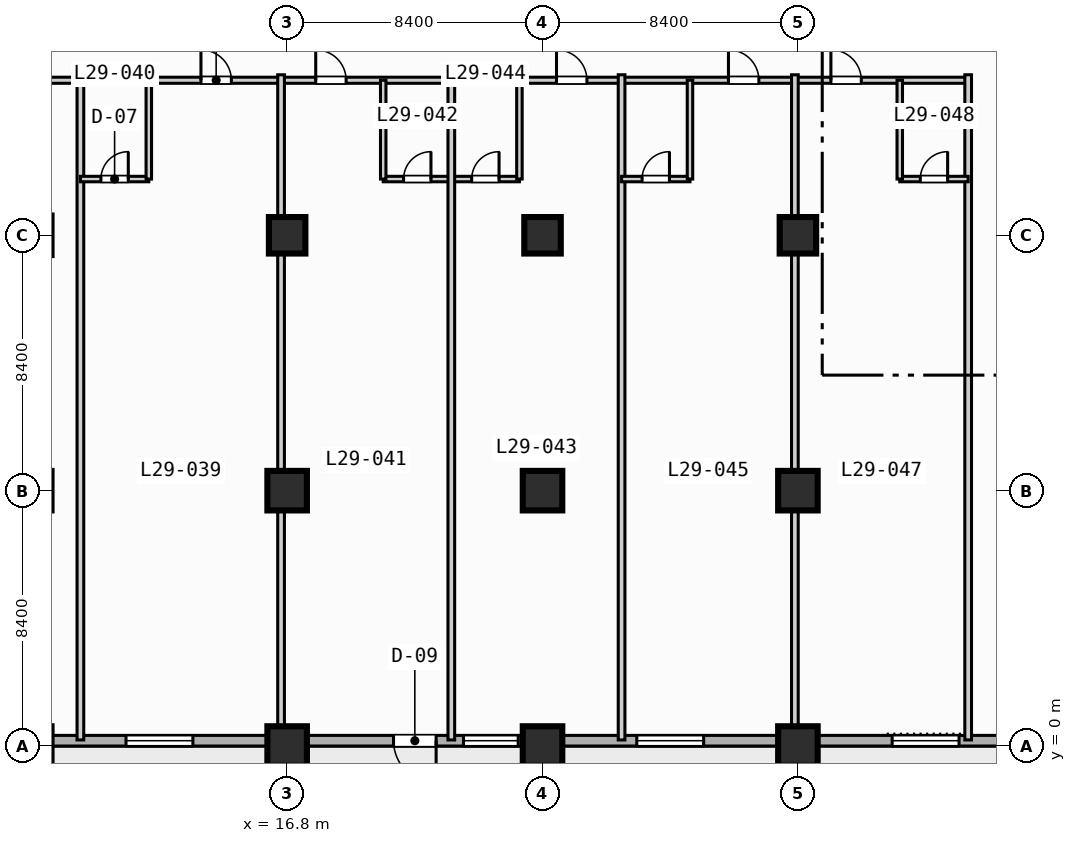
"""IFC4 building model, lengths in metres.
Left out: names, types, materials, properties, quantities, classifications, styles, units other than length and angle.
Written with IfcOpenShell. Run it as: python <this file> out.ifc"""

import sys

from ifc_helpers import new_model, si_unit, direction, frame, frame_2d, origin, origin_2d, place, context, subcontext, project, spatial, rectangle, extrude, element, fill, save


model = new_model("IFC4")
c1 = context("Model", 3, precision=1e-05, world=origin(), true_north=direction((0.0, 1.0)))
c2 = subcontext(c1, "Body", "Model", "MODEL_VIEW")
j1 = project(units=[si_unit("LENGTHUNIT", "METRE"), si_unit("PLANEANGLEUNIT", "RADIAN")], contexts=[c1])
p1 = place(None, origin())
s1 = spatial("IfcSite", under=j1, at=p1, CompositionType="ELEMENT")
p2 = place(p1, origin())
s2 = spatial("IfcBuilding", under=s1, at=p2, CompositionType="ELEMENT")
p3 = place(p2, frame((0.0, 0.0, 122.8)))
s3 = spatial("IfcBuildingStorey", under=s2, at=p3, CompositionType="ELEMENT", Elevation=122.8)
for number, where, z_axis, x_axis in (
    (1, (16.8, 0.0, 0.0), (0.0, 0.0, 1.0), (1.0, 0.0, 0.0)),
    (2, (16.8, 8.4, 0.0), (0.0, 0.0, 1.0), (1.0, 0.0, 0.0)),
):
    element("IfcColumn", number, at=place(p3, frame(where, z_axis=z_axis, x_axis=x_axis)), inside=s3, PredefinedType="COLUMN", context=c2, shape_type="SweptSolid", body=[
        extrude(rectangle(XDim=1.3, YDim=1.3, at=origin_2d()), origin(), (0.0, 0.0, 1.0), 3.8),
    ])
p4 = place(p3, frame((16.8, 16.8, 0.0), z_axis=(0.0, 0.0, 1.0), x_axis=(1.0, 0.0, 0.0)))
e3 = element("IfcColumn", 3, at=p4, inside=s3, PredefinedType="COLUMN", context=c2, shape_type="SweptSolid", body=[
    extrude(rectangle(XDim=1.2, YDim=1.2, at=origin_2d()), origin(), (0.0, 0.0, 1.0), 3.8),
])
for number, where, z_axis, x_axis in (
    (4, (25.2, 0.0, 0.0), (0.0, 0.0, 1.0), (1.0, 0.0, 0.0)),
    (5, (25.2, 8.4, 0.0), (0.0, 0.0, 1.0), (1.0, 0.0, 0.0)),
):
    element("IfcColumn", number, at=place(p3, frame(where, z_axis=z_axis, x_axis=x_axis)), inside=s3, PredefinedType="COLUMN", context=c2, shape_type="SweptSolid", body=[
        extrude(rectangle(XDim=1.3, YDim=1.3, at=origin_2d()), origin(), (0.0, 0.0, 1.0), 3.8),
    ])
p5 = place(p3, frame((25.2, 16.8, 0.0), z_axis=(0.0, 0.0, 1.0), x_axis=(1.0, 0.0, 0.0)))
e6 = element("IfcColumn", 6, at=p5, inside=s3, PredefinedType="COLUMN", context=c2, shape_type="SweptSolid", body=[
    extrude(rectangle(XDim=1.2, YDim=1.2, at=origin_2d()), origin(), (0.0, 0.0, 1.0), 3.8),
])
for number, where, z_axis, x_axis in (
    (7, (33.6, 0.0, 0.0), (0.0, 0.0, 1.0), (1.0, 0.0, 0.0)),
    (8, (33.6, 8.4, 0.0), (0.0, 0.0, 1.0), (1.0, 0.0, 0.0)),
):
    element("IfcColumn", number, at=place(p3, frame(where, z_axis=z_axis, x_axis=x_axis)), inside=s3, PredefinedType="COLUMN", context=c2, shape_type="SweptSolid", body=[
        extrude(rectangle(XDim=1.3, YDim=1.3, at=origin_2d()), origin(), (0.0, 0.0, 1.0), 3.8),
    ])
p6 = place(p3, frame((33.6, 16.8, 0.0), z_axis=(0.0, 0.0, 1.0), x_axis=(1.0, 0.0, 0.0)))
e9 = element("IfcColumn", 9, at=p6, inside=s3, PredefinedType="COLUMN", context=c2, shape_type="SweptSolid", body=[
    extrude(rectangle(XDim=1.2, YDim=1.2, at=origin_2d()), origin(), (0.0, 0.0, 1.0), 3.8),
])
p7 = place(p3, frame((72.425, 0.175, 0.0), z_axis=(0.0, 0.0, 1.0), x_axis=(-1.0, 0.0, 0.0)))
e10 = element("IfcWall", 10, at=p7, inside=s3, PredefinedType="STANDARD", context=c2, shape_type="SweptSolid", body=[
    extrude(rectangle(XDim=69.25, YDim=0.35, at=frame_2d((34.625, 0.0))), origin(), (0.0, 0.0, 1.0), 3.55),
])
p8 = place(p7, frame((50.725, 0.0, 0.0)))
e11 = element("IfcOpeningElement", 11, at=p8, cuts=e10, PredefinedType="OPENING", context=c2, shape_type="SweptSolid", body=[
    extrude(rectangle(XDim=1.4, YDim=2.2, at=frame_2d((0.7, 1.1))), frame((0.0, 0.185, 0.0), z_axis=(0.0, -1.0, 0.0), x_axis=(1.0, 0.0, 0.0)), (0.0, 0.0, 1.0), 0.37),
])
p9 = place(p7, frame((58.725, 0.0, 0.85)))
e12 = element("IfcOpeningElement", 12, at=p9, cuts=e10, PredefinedType="OPENING", context=c2, shape_type="SweptSolid", body=[
    extrude(rectangle(XDim=2.2, YDim=1.8, at=frame_2d((1.1, 0.9))), frame((0.0, 0.185, 0.0), z_axis=(0.0, -1.0, 0.0), x_axis=(1.0, 0.0, 0.0)), (0.0, 0.0, 1.0), 0.37),
])
p10 = place(p7, frame((41.925, 0.0, 0.85)))
e13 = element("IfcOpeningElement", 13, at=p10, cuts=e10, PredefinedType="OPENING", context=c2, shape_type="SweptSolid", body=[
    extrude(rectangle(XDim=2.2, YDim=1.8, at=frame_2d((1.1, 0.9))), frame((0.0, 0.185, 0.0), z_axis=(0.0, -1.0, 0.0), x_axis=(1.0, 0.0, 0.0)), (0.0, 0.0, 1.0), 0.37),
])
p11 = place(p7, frame((33.525, 0.0, 0.85)))
e14 = element("IfcOpeningElement", 14, at=p11, cuts=e10, PredefinedType="OPENING", context=c2, shape_type="SweptSolid", body=[
    extrude(rectangle(XDim=2.2, YDim=1.8, at=frame_2d((1.1, 0.9))), frame((0.0, 0.185, 0.0), z_axis=(0.0, -1.0, 0.0), x_axis=(1.0, 0.0, 0.0)), (0.0, 0.0, 1.0), 0.37),
])
p12 = place(p7, frame((25.125, 0.0, 0.85)))
e15 = element("IfcOpeningElement", 15, at=p12, cuts=e10, PredefinedType="OPENING", context=c2, shape_type="SweptSolid", body=[
    extrude(rectangle(XDim=2.2, YDim=1.8, at=frame_2d((1.1, 0.9))), frame((0.0, 0.185, 0.0), z_axis=(0.0, -1.0, 0.0), x_axis=(1.0, 0.0, 0.0)), (0.0, 0.0, 1.0), 0.37),
])
p13 = place(p7, frame((64.825, 0.0, 0.85)))
e16 = element("IfcOpeningElement", 16, at=p13, cuts=e10, PredefinedType="OPENING", context=c2, shape_type="SweptSolid", body=[
    extrude(rectangle(XDim=1.8, YDim=1.8, at=frame_2d((0.9, 0.9))), frame((0.0, 0.185, 0.0), z_axis=(0.0, -1.0, 0.0), x_axis=(1.0, 0.0, 0.0)), (0.0, 0.0, 1.0), 0.37),
])
p14 = place(p7, frame((48.025, 0.0, 0.85)))
e17 = element("IfcOpeningElement", 17, at=p14, cuts=e10, PredefinedType="OPENING", context=c2, shape_type="SweptSolid", body=[
    extrude(rectangle(XDim=1.8, YDim=1.8, at=frame_2d((0.9, 0.9))), frame((0.0, 0.185, 0.0), z_axis=(0.0, -1.0, 0.0), x_axis=(1.0, 0.0, 0.0)), (0.0, 0.0, 1.0), 0.37),
])
p15 = place(p3, frame((3.4, 21.9, 0.0), z_axis=(0.0, 0.0, 1.0), x_axis=(1.0, 0.0, 0.0)))
e18 = element("IfcWall", 18, at=p15, inside=s3, PredefinedType="PARTITIONING", context=c2, shape_type="SweptSolid", body=[
    extrude(rectangle(XDim=35.8, YDim=0.2, at=frame_2d((17.9, 0.0))), origin(), (0.0, 0.0, 1.0), 3.55),
])
p16 = place(p15, frame((3.965, 0.0, 0.0)))
e19 = element("IfcOpeningElement", 19, at=p16, cuts=e18, PredefinedType="OPENING", context=c2, shape_type="SweptSolid", body=[
    extrude(rectangle(XDim=1.0, YDim=2.15, at=frame_2d((0.5, 1.075))), frame((0.0, 0.11, 0.0), z_axis=(0.0, -1.0, 0.0), x_axis=(1.0, 0.0, 0.0)), (0.0, 0.0, 1.0), 0.22),
])
p17 = place(p15, frame((10.565, 0.0, 0.0)))
e20 = element("IfcOpeningElement", 20, at=p17, cuts=e18, PredefinedType="OPENING", context=c2, shape_type="SweptSolid", body=[
    extrude(rectangle(XDim=1.0, YDim=2.15, at=frame_2d((0.5, 1.075))), frame((0.0, 0.11, 0.0), z_axis=(0.0, -1.0, 0.0), x_axis=(1.0, 0.0, 0.0)), (0.0, 0.0, 1.0), 0.22),
])
p18 = place(p15, frame((14.34, 0.0, 0.0)))
e21 = element("IfcOpeningElement", 21, at=p18, cuts=e18, PredefinedType="OPENING", context=c2, shape_type="SweptSolid", body=[
    extrude(rectangle(XDim=1.0, YDim=2.15, at=frame_2d((0.5, 1.075))), frame((0.0, 0.11, 0.0), z_axis=(0.0, -1.0, 0.0), x_axis=(1.0, 0.0, 0.0)), (0.0, 0.0, 1.0), 0.22),
])
p19 = place(p15, frame((22.26, 0.0, 0.0)))
e22 = element("IfcOpeningElement", 22, at=p19, cuts=e18, PredefinedType="OPENING", context=c2, shape_type="SweptSolid", body=[
    extrude(rectangle(XDim=1.0, YDim=2.15, at=frame_2d((0.5, 1.075))), frame((0.0, 0.11, 0.0), z_axis=(0.0, -1.0, 0.0), x_axis=(1.0, 0.0, 0.0)), (0.0, 0.0, 1.0), 0.22),
])
p20 = place(p15, frame((27.915, 0.0, 0.0)))
e23 = element("IfcOpeningElement", 23, at=p20, cuts=e18, PredefinedType="OPENING", context=c2, shape_type="SweptSolid", body=[
    extrude(rectangle(XDim=1.0, YDim=2.15, at=frame_2d((0.5, 1.075))), frame((0.0, 0.11, 0.0), z_axis=(0.0, -1.0, 0.0), x_axis=(1.0, 0.0, 0.0)), (0.0, 0.0, 1.0), 0.22),
])
p21 = place(p15, frame((31.285, 0.0, 0.0)))
e24 = element("IfcOpeningElement", 24, at=p21, cuts=e18, PredefinedType="OPENING", context=c2, shape_type="SweptSolid", body=[
    extrude(rectangle(XDim=1.0, YDim=2.15, at=frame_2d((0.5, 1.075))), frame((0.0, 0.11, 0.0), z_axis=(0.0, -1.0, 0.0), x_axis=(1.0, 0.0, 0.0)), (0.0, 0.0, 1.0), 0.22),
])
p22 = place(p3, frame((10.0, 0.2, 0.0), z_axis=(0.0, 0.0, 1.0), x_axis=(0.0, 1.0, 0.0)))
e25 = element("IfcWall", 25, at=p22, inside=s3, PredefinedType="PARTITIONING", context=c2, shape_type="SweptSolid", body=[
    extrude(rectangle(XDim=21.88, YDim=0.22, at=frame_2d((10.94, 0.0))), origin(), (0.0, 0.0, 1.0), 3.55),
])
p23 = place(p3, frame((10.0, 18.65, 0.0), z_axis=(0.0, 0.0, 1.0), x_axis=(1.0, 0.0, 0.0)))
e26 = element("IfcWall", 26, at=p23, inside=s3, PredefinedType="PLUMBINGWALL", context=c2, shape_type="SweptSolid", body=[
    extrude(rectangle(XDim=2.25, YDim=0.18, at=frame_2d((1.125, 0.0))), origin(), (0.0, 0.0, 1.0), 3.55),
])
p24 = place(p23, frame((0.675, 0.0, 0.0)))
e27 = element("IfcOpeningElement", 27, at=p24, cuts=e26, PredefinedType="OPENING", context=c2, shape_type="SweptSolid", body=[
    extrude(rectangle(XDim=0.9, YDim=2.1, at=frame_2d((0.45, 1.05))), frame((0.0, 0.1, 0.0), z_axis=(0.0, -1.0, 0.0), x_axis=(1.0, 0.0, 0.0)), (0.0, 0.0, 1.0), 0.2),
])
p25 = place(p3, frame((12.25, 18.65, 0.0), z_axis=(0.0, 0.0, 1.0), x_axis=(0.0, 1.0, 0.0)))
e28 = element("IfcWall", 28, at=p25, inside=s3, PredefinedType="PLUMBINGWALL", context=c2, shape_type="SweptSolid", body=[
    extrude(rectangle(XDim=3.25, YDim=0.18, at=frame_2d((1.625, 0.0))), origin(), (0.0, 0.0, 1.0), 3.55),
])
p26 = place(p3, frame((16.6, 0.2, 0.0), z_axis=(0.0, 0.0, 1.0), x_axis=(0.0, 1.0, 0.0)))
e29 = element("IfcWall", 29, at=p26, inside=s3, PredefinedType="PARTITIONING", context=c2, shape_type="SweptSolid", body=[
    extrude(rectangle(XDim=21.88, YDim=0.22, at=frame_2d((10.94, 0.0))), origin(), (0.0, 0.0, 1.0), 2.8),
])
p27 = place(p3, frame((19.96, 18.65, 0.0), z_axis=(0.0, 0.0, 1.0), x_axis=(1.0, 0.0, 0.0)))
e30 = element("IfcWall", 30, at=p27, inside=s3, PredefinedType="PLUMBINGWALL", context=c2, shape_type="SweptSolid", body=[
    extrude(rectangle(XDim=4.48, YDim=0.18, at=frame_2d((2.24, 0.0))), origin(), (0.0, 0.0, 1.0), 3.55),
])
p28 = place(p27, frame((0.67, 0.0, 0.0)))
e31 = element("IfcOpeningElement", 31, at=p28, cuts=e30, PredefinedType="OPENING", context=c2, shape_type="SweptSolid", body=[
    extrude(rectangle(XDim=0.9, YDim=2.1, at=frame_2d((0.45, 1.05))), frame((0.0, 0.1, 0.0), z_axis=(0.0, -1.0, 0.0), x_axis=(1.0, 0.0, 0.0)), (0.0, 0.0, 1.0), 0.2),
])
p29 = place(p27, frame((2.91, 0.0, 0.0)))
e32 = element("IfcOpeningElement", 32, at=p29, cuts=e30, PredefinedType="OPENING", context=c2, shape_type="SweptSolid", body=[
    extrude(rectangle(XDim=0.9, YDim=2.1, at=frame_2d((0.45, 1.05))), frame((0.0, 0.1, 0.0), z_axis=(0.0, -1.0, 0.0), x_axis=(1.0, 0.0, 0.0)), (0.0, 0.0, 1.0), 0.2),
])
p30 = place(p3, frame((19.96, 18.65, 0.0), z_axis=(0.0, 0.0, 1.0), x_axis=(0.0, 1.0, 0.0)))
e33 = element("IfcWall", 33, at=p30, inside=s3, PredefinedType="PLUMBINGWALL", context=c2, shape_type="SweptSolid", body=[
    extrude(rectangle(XDim=3.25, YDim=0.18, at=frame_2d((1.625, 0.0))), origin(), (0.0, 0.0, 1.0), 3.55),
])
p31 = place(p3, frame((22.2, 0.2, 0.0), z_axis=(0.0, 0.0, 1.0), x_axis=(0.0, 1.0, 0.0)))
e34 = element("IfcWall", 34, at=p31, inside=s3, PredefinedType="PARTITIONING", context=c2, shape_type="SweptSolid", body=[
    extrude(rectangle(XDim=21.88, YDim=0.22, at=frame_2d((10.94, 0.0))), origin(), (0.0, 0.0, 1.0), 3.55),
])
p32 = place(p3, frame((24.44, 18.65, 0.0), z_axis=(0.0, 0.0, 1.0), x_axis=(0.0, 1.0, 0.0)))
e35 = element("IfcWall", 35, at=p32, inside=s3, PredefinedType="PLUMBINGWALL", context=c2, shape_type="SweptSolid", body=[
    extrude(rectangle(XDim=3.25, YDim=0.18, at=frame_2d((1.625, 0.0))), origin(), (0.0, 0.0, 1.0), 3.55),
])
p33 = place(p3, frame((27.8, 0.2, 0.0), z_axis=(0.0, 0.0, 1.0), x_axis=(0.0, 1.0, 0.0)))
e36 = element("IfcWall", 36, at=p33, inside=s3, PredefinedType="PARTITIONING", context=c2, shape_type="SweptSolid", body=[
    extrude(rectangle(XDim=21.88, YDim=0.22, at=frame_2d((10.94, 0.0))), origin(), (0.0, 0.0, 1.0), 3.55),
])
p34 = place(p3, frame((27.8, 18.65, 0.0), z_axis=(0.0, 0.0, 1.0), x_axis=(1.0, 0.0, 0.0)))
e37 = element("IfcWall", 37, at=p34, inside=s3, PredefinedType="PLUMBINGWALL", context=c2, shape_type="SweptSolid", body=[
    extrude(rectangle(XDim=2.25, YDim=0.18, at=frame_2d((1.125, 0.0))), origin(), (0.0, 0.0, 1.0), 3.55),
])
p35 = place(p34, frame((0.675, 0.0, 0.0)))
e38 = element("IfcOpeningElement", 38, at=p35, cuts=e37, PredefinedType="OPENING", context=c2, shape_type="SweptSolid", body=[
    extrude(rectangle(XDim=0.9, YDim=2.1, at=frame_2d((0.45, 1.05))), frame((0.0, 0.1, 0.0), z_axis=(0.0, -1.0, 0.0), x_axis=(1.0, 0.0, 0.0)), (0.0, 0.0, 1.0), 0.2),
])
p36 = place(p3, frame((30.05, 18.65, 0.0), z_axis=(0.0, 0.0, 1.0), x_axis=(0.0, 1.0, 0.0)))
e39 = element("IfcWall", 39, at=p36, inside=s3, PredefinedType="PLUMBINGWALL", context=c2, shape_type="SweptSolid", body=[
    extrude(rectangle(XDim=3.25, YDim=0.18, at=frame_2d((1.625, 0.0))), origin(), (0.0, 0.0, 1.0), 3.55),
])
p37 = place(p3, frame((33.5, 0.2, 0.0), z_axis=(0.0, 0.0, 1.0), x_axis=(0.0, 1.0, 0.0)))
e40 = element("IfcWall", 40, at=p37, inside=s3, PredefinedType="PARTITIONING", context=c2, shape_type="SweptSolid", body=[
    extrude(rectangle(XDim=21.88, YDim=0.22, at=frame_2d((10.94, 0.0))), origin(), (0.0, 0.0, 1.0), 2.8),
])
p38 = place(p3, frame((39.2, 0.2, 0.0), z_axis=(0.0, 0.0, 1.0), x_axis=(0.0, 1.0, 0.0)))
e41 = element("IfcWall", 41, at=p38, inside=s3, PredefinedType="PARTITIONING", context=c2, shape_type="SweptSolid", body=[
    extrude(rectangle(XDim=21.88, YDim=0.22, at=frame_2d((10.94, 0.0))), origin(), (0.0, 0.0, 1.0), 3.55),
])
p39 = place(p3, frame((36.95, 18.65, 0.0), z_axis=(0.0, 0.0, 1.0), x_axis=(1.0, 0.0, 0.0)))
e42 = element("IfcWall", 42, at=p39, inside=s3, PredefinedType="PLUMBINGWALL", context=c2, shape_type="SweptSolid", body=[
    extrude(rectangle(XDim=2.25, YDim=0.18, at=frame_2d((1.125, 0.0))), origin(), (0.0, 0.0, 1.0), 3.55),
])
p40 = place(p39, frame((0.675, 0.0, 0.0)))
e43 = element("IfcOpeningElement", 43, at=p40, cuts=e42, PredefinedType="OPENING", context=c2, shape_type="SweptSolid", body=[
    extrude(rectangle(XDim=0.9, YDim=2.1, at=frame_2d((0.45, 1.05))), frame((0.0, 0.1, 0.0), z_axis=(0.0, -1.0, 0.0), x_axis=(1.0, 0.0, 0.0)), (0.0, 0.0, 1.0), 0.2),
])
p41 = place(p3, frame((36.95, 18.65, 0.0), z_axis=(0.0, 0.0, 1.0), x_axis=(0.0, 1.0, 0.0)))
e44 = element("IfcWall", 44, at=p41, inside=s3, PredefinedType="PLUMBINGWALL", context=c2, shape_type="SweptSolid", body=[
    extrude(rectangle(XDim=3.25, YDim=0.18, at=frame_2d((1.625, 0.0))), origin(), (0.0, 0.0, 1.0), 3.55),
])
p42 = place(p8, origin())
e45 = element("IfcDoor", 45, at=p42, inside=s3, OperationType="SINGLE_SWING_LEFT", PredefinedType="DOOR", context=c2, shape_type="SweptSolid", body=[
    extrude(rectangle(XDim=1.4, YDim=2.2, at=frame_2d((0.7, 1.1))), frame((0.0, 0.025, 0.0), z_axis=(0.0, -1.0, 0.0), x_axis=(1.0, 0.0, 0.0)), (0.0, 0.0, 1.0), 0.05),
])
fill(e11, e45)
p43 = place(p9, origin())
e46 = element("IfcWindow", 46, at=p43, inside=s3, PartitioningType="SINGLE_PANEL", PredefinedType="WINDOW", context=c2, shape_type="SweptSolid", body=[
    extrude(rectangle(XDim=2.2, YDim=1.8, at=frame_2d((1.1, 0.9))), frame((0.0, 0.03, 0.0), z_axis=(0.0, -1.0, 0.0), x_axis=(1.0, 0.0, 0.0)), (0.0, 0.0, 1.0), 0.06),
])
fill(e12, e46)
p44 = place(p10, origin())
e47 = element("IfcWindow", 47, at=p44, inside=s3, PartitioningType="SINGLE_PANEL", PredefinedType="WINDOW", context=c2, shape_type="SweptSolid", body=[
    extrude(rectangle(XDim=2.2, YDim=1.8, at=frame_2d((1.1, 0.9))), frame((0.0, 0.03, 0.0), z_axis=(0.0, -1.0, 0.0), x_axis=(1.0, 0.0, 0.0)), (0.0, 0.0, 1.0), 0.06),
])
fill(e13, e47)
p45 = place(p11, origin())
e48 = element("IfcWindow", 48, at=p45, inside=s3, PartitioningType="SINGLE_PANEL", PredefinedType="WINDOW", context=c2, shape_type="SweptSolid", body=[
    extrude(rectangle(XDim=2.2, YDim=1.8, at=frame_2d((1.1, 0.9))), frame((0.0, 0.03, 0.0), z_axis=(0.0, -1.0, 0.0), x_axis=(1.0, 0.0, 0.0)), (0.0, 0.0, 1.0), 0.06),
])
fill(e14, e48)
p46 = place(p14, origin())
e49 = element("IfcWindow", 49, at=p46, inside=s3, PartitioningType="SINGLE_PANEL", PredefinedType="WINDOW", context=c2, shape_type="SweptSolid", body=[
    extrude(rectangle(XDim=1.8, YDim=1.8, at=frame_2d((0.9, 0.9))), frame((0.0, 0.03, 0.0), z_axis=(0.0, -1.0, 0.0), x_axis=(1.0, 0.0, 0.0)), (0.0, 0.0, 1.0), 0.06),
])
fill(e17, e49)
p47 = place(p17, origin())
e50 = element("IfcDoor", 50, at=p47, inside=s3, OperationType="SINGLE_SWING_LEFT", PredefinedType="DOOR", context=c2, shape_type="SweptSolid", body=[
    extrude(rectangle(XDim=1.0, YDim=2.15, at=frame_2d((0.5, 1.075))), frame((0.0, 0.025, 0.0), z_axis=(0.0, -1.0, 0.0), x_axis=(1.0, 0.0, 0.0)), (0.0, 0.0, 1.0), 0.05),
])
fill(e20, e50)
p48 = place(p18, origin())
e51 = element("IfcDoor", 51, at=p48, inside=s3, OperationType="SINGLE_SWING_LEFT", PredefinedType="DOOR", context=c2, shape_type="SweptSolid", body=[
    extrude(rectangle(XDim=1.0, YDim=2.15, at=frame_2d((0.5, 1.075))), frame((0.0, 0.025, 0.0), z_axis=(0.0, -1.0, 0.0), x_axis=(1.0, 0.0, 0.0)), (0.0, 0.0, 1.0), 0.05),
])
fill(e21, e51)
p49 = place(p19, origin())
e52 = element("IfcDoor", 52, at=p49, inside=s3, OperationType="SINGLE_SWING_LEFT", PredefinedType="DOOR", context=c2, shape_type="SweptSolid", body=[
    extrude(rectangle(XDim=1.0, YDim=2.15, at=frame_2d((0.5, 1.075))), frame((0.0, 0.025, 0.0), z_axis=(0.0, -1.0, 0.0), x_axis=(1.0, 0.0, 0.0)), (0.0, 0.0, 1.0), 0.05),
])
fill(e22, e52)
p50 = place(p20, origin())
e53 = element("IfcDoor", 53, at=p50, inside=s3, OperationType="SINGLE_SWING_LEFT", PredefinedType="DOOR", context=c2, shape_type="SweptSolid", body=[
    extrude(rectangle(XDim=1.0, YDim=2.15, at=frame_2d((0.5, 1.075))), frame((0.0, 0.025, 0.0), z_axis=(0.0, -1.0, 0.0), x_axis=(1.0, 0.0, 0.0)), (0.0, 0.0, 1.0), 0.05),
])
fill(e23, e53)
p51 = place(p21, origin())
e54 = element("IfcDoor", 54, at=p51, inside=s3, OperationType="SINGLE_SWING_LEFT", PredefinedType="DOOR", context=c2, shape_type="SweptSolid", body=[
    extrude(rectangle(XDim=1.0, YDim=2.15, at=frame_2d((0.5, 1.075))), frame((0.0, 0.025, 0.0), z_axis=(0.0, -1.0, 0.0), x_axis=(1.0, 0.0, 0.0)), (0.0, 0.0, 1.0), 0.05),
])
fill(e24, e54)
p52 = place(p24, origin())
e55 = element("IfcDoor", 55, at=p52, inside=s3, OperationType="SINGLE_SWING_RIGHT", PredefinedType="DOOR", context=c2, shape_type="SweptSolid", body=[
    extrude(rectangle(XDim=0.9, YDim=2.1, at=frame_2d((0.45, 1.05))), frame((0.0, 0.025, 0.0), z_axis=(0.0, -1.0, 0.0), x_axis=(1.0, 0.0, 0.0)), (0.0, 0.0, 1.0), 0.05),
])
fill(e27, e55)
p53 = place(p28, origin())
e56 = element("IfcDoor", 56, at=p53, inside=s3, OperationType="SINGLE_SWING_RIGHT", PredefinedType="DOOR", context=c2, shape_type="SweptSolid", body=[
    extrude(rectangle(XDim=0.9, YDim=2.1, at=frame_2d((0.45, 1.05))), frame((0.0, 0.025, 0.0), z_axis=(0.0, -1.0, 0.0), x_axis=(1.0, 0.0, 0.0)), (0.0, 0.0, 1.0), 0.05),
])
fill(e31, e56)
p54 = place(p29, origin())
e57 = element("IfcDoor", 57, at=p54, inside=s3, OperationType="SINGLE_SWING_RIGHT", PredefinedType="DOOR", context=c2, shape_type="SweptSolid", body=[
    extrude(rectangle(XDim=0.9, YDim=2.1, at=frame_2d((0.45, 1.05))), frame((0.0, 0.025, 0.0), z_axis=(0.0, -1.0, 0.0), x_axis=(1.0, 0.0, 0.0)), (0.0, 0.0, 1.0), 0.05),
])
fill(e32, e57)
p55 = place(p35, origin())
e58 = element("IfcDoor", 58, at=p55, inside=s3, OperationType="SINGLE_SWING_RIGHT", PredefinedType="DOOR", context=c2, shape_type="SweptSolid", body=[
    extrude(rectangle(XDim=0.9, YDim=2.1, at=frame_2d((0.45, 1.05))), frame((0.0, 0.025, 0.0), z_axis=(0.0, -1.0, 0.0), x_axis=(1.0, 0.0, 0.0)), (0.0, 0.0, 1.0), 0.05),
])
fill(e38, e58)
p56 = place(p40, origin())
e59 = element("IfcDoor", 59, at=p56, inside=s3, OperationType="SINGLE_SWING_RIGHT", PredefinedType="DOOR", context=c2, shape_type="SweptSolid", body=[
    extrude(rectangle(XDim=0.9, YDim=2.1, at=frame_2d((0.45, 1.05))), frame((0.0, 0.025, 0.0), z_axis=(0.0, -1.0, 0.0), x_axis=(1.0, 0.0, 0.0)), (0.0, 0.0, 1.0), 0.05),
])
fill(e43, e59)
save(model, sys.argv[1])
